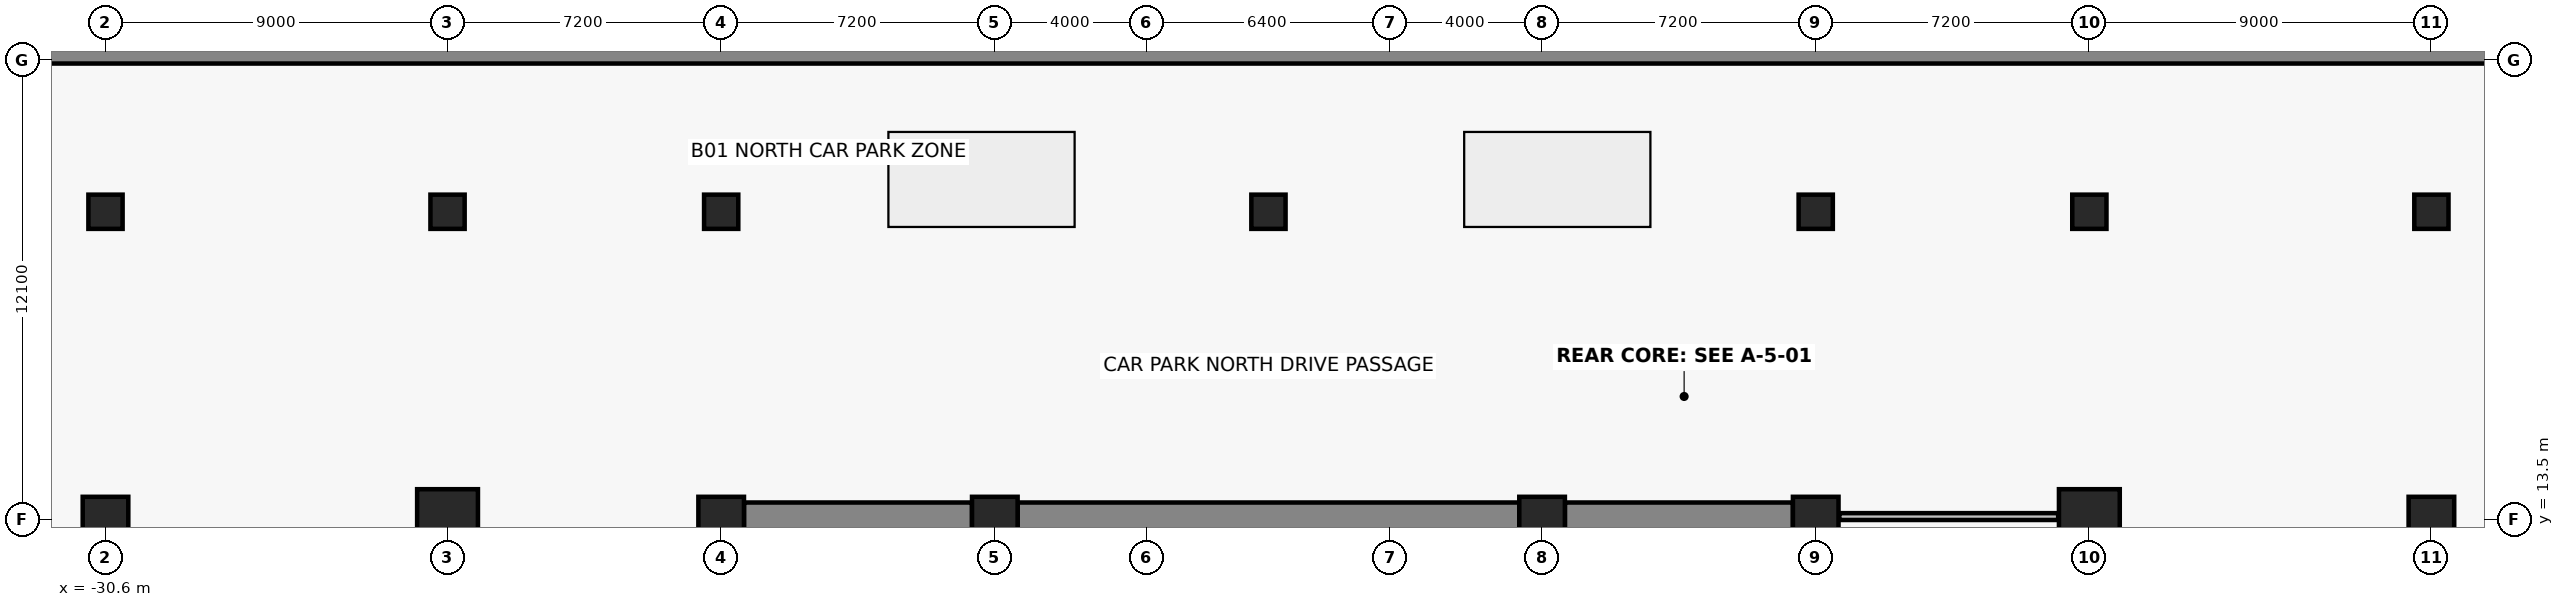
"""IFC4 building model, lengths in metres.
Left out: names, types, materials, properties, quantities, classifications, styles, units other than length and angle.
Written with IfcOpenShell. Run it as: python <this file> out.ifc"""

import sys

from ifc_helpers import new_model, si_unit, direction, frame, frame_2d, origin, origin_2d, place, context, subcontext, project, spatial, rectangle, extrude, element, save


model = new_model("IFC4")
c1 = context("Model", 3, precision=1e-05, world=origin(), true_north=direction((0.0, 1.0)))
c2 = subcontext(c1, "Body", "Model", "MODEL_VIEW")
j1 = project(units=[si_unit("LENGTHUNIT", "METRE"), si_unit("PLANEANGLEUNIT", "RADIAN")], contexts=[c1])
p1 = place(None, origin())
s1 = spatial("IfcSite", under=j1, at=p1, CompositionType="ELEMENT")
p2 = place(p1, origin())
s2 = spatial("IfcBuilding", under=s1, at=p2, CompositionType="ELEMENT")
p3 = place(p2, frame((0.0, 0.0, -4.4)))
s3 = spatial("IfcBuildingStorey", under=s2, at=p3, CompositionType="ELEMENT", Elevation=-4.4)
p4 = place(p3, frame((-37.1, 25.85, 0.0), z_axis=(0.0, 0.0, 1.0), x_axis=(1.0, 0.0, 0.0)))
e1 = element("IfcWall", 1, at=p4, inside=s3, PredefinedType="USERDEFINED", context=c2, shape_type="SweptSolid", body=[
    extrude(rectangle(XDim=74.2, YDim=0.7, at=frame_2d((37.1, 0.0))), origin(), (0.0, 0.0, 1.0), 4.1),
])
for number, where, z_axis, x_axis in (
    (2, (-14.4, 13.5, 0.0), (0.0, 0.0, 1.0), (1.0, 0.0, 0.0)),
    (3, (-7.2, 13.5, 0.0), (0.0, 0.0, 1.0), (1.0, 0.0, 0.0)),
    (4, (7.2, 13.5, 0.0), (0.0, 0.0, 1.0), (1.0, 0.0, 0.0)),
    (5, (14.4, 13.5, 0.0), (0.0, 0.0, 1.0), (1.0, 0.0, 0.0)),
):
    element("IfcColumn", number, at=place(p3, frame(where, z_axis=z_axis, x_axis=x_axis)), inside=s3, PredefinedType="COLUMN", context=c2, shape_type="SweptSolid", body=[
        extrude(rectangle(XDim=1.2, YDim=1.2, at=origin_2d()), origin(), (0.0, 0.0, 1.0), 4.4),
    ])
for number, where, z_axis, x_axis in (
    (6, (-21.6, 13.5, 0.0), (0.0, 0.0, 1.0), (1.0, 0.0, 0.0)),
    (7, (21.6, 13.5, 0.0), (0.0, 0.0, 1.0), (1.0, 0.0, 0.0)),
):
    element("IfcColumn", number, at=place(p3, frame(where, z_axis=z_axis, x_axis=x_axis)), inside=s3, PredefinedType="COLUMN", context=c2, shape_type="SweptSolid", body=[
        extrude(rectangle(XDim=1.6, YDim=1.6, at=origin_2d()), origin(), (0.0, 0.0, 1.0), 4.4),
    ])
for number, where, z_axis, x_axis in (
    (8, (-30.6, 13.5, 0.0), (0.0, 0.0, 1.0), (1.0, 0.0, 0.0)),
    (9, (30.6, 13.5, 0.0), (0.0, 0.0, 1.0), (1.0, 0.0, 0.0)),
):
    element("IfcColumn", number, at=place(p3, frame(where, z_axis=z_axis, x_axis=x_axis)), inside=s3, PredefinedType="COLUMN", context=c2, shape_type="SweptSolid", body=[
        extrude(rectangle(XDim=1.2, YDim=1.2, at=origin_2d()), origin(), (0.0, 0.0, 1.0), 4.4),
    ])
for number, where, z_axis, x_axis in (
    (10, (-30.6, 21.6, 0.0), (0.0, 0.0, 1.0), (1.0, 0.0, 0.0)),
    (11, (30.6, 21.6, 0.0), (0.0, 0.0, 1.0), (1.0, 0.0, 0.0)),
    (12, (-21.6, 21.6, 0.0), (0.0, 0.0, 1.0), (1.0, 0.0, 0.0)),
    (13, (21.6, 21.6, 0.0), (0.0, 0.0, 1.0), (1.0, 0.0, 0.0)),
    (14, (-14.4, 21.6, 0.0), (0.0, 0.0, 1.0), (1.0, 0.0, 0.0)),
    (15, (0.0, 21.6, 0.0), (0.0, 0.0, 1.0), (1.0, 0.0, 0.0)),
    (16, (14.4, 21.6, 0.0), (0.0, 0.0, 1.0), (1.0, 0.0, 0.0)),
):
    element("IfcColumn", number, at=place(p3, frame(where, z_axis=z_axis, x_axis=x_axis)), inside=s3, PredefinedType="COLUMN", context=c2, shape_type="SweptSolid", body=[
        extrude(rectangle(XDim=0.9, YDim=0.9, at=origin_2d()), origin(), (0.0, 0.0, 1.0), 4.4),
    ])
p5 = place(p3, frame((-13.8, 13.5, 0.0), z_axis=(0.0, 0.0, 1.0), x_axis=(1.0, 0.0, 0.0)))
e17 = element("IfcWall", 17, at=p5, inside=s3, PredefinedType="SHEAR", context=c2, shape_type="SweptSolid", body=[
    extrude(rectangle(XDim=6.0, YDim=0.9, at=frame_2d((3.0, 0.0))), origin(), (0.0, 0.0, 1.0), 4.1),
])
p6 = place(p3, frame((-6.6, 13.5, 0.0), z_axis=(0.0, 0.0, 1.0), x_axis=(1.0, 0.0, 0.0)))
e18 = element("IfcWall", 18, at=p6, inside=s3, PredefinedType="SHEAR", context=c2, shape_type="SweptSolid", body=[
    extrude(rectangle(XDim=13.2, YDim=0.9, at=frame_2d((6.6, 0.0))), origin(), (0.0, 0.0, 1.0), 4.1),
])
p7 = place(p3, frame((7.8, 13.5, 0.0), z_axis=(0.0, 0.0, 1.0), x_axis=(1.0, 0.0, 0.0)))
e19 = element("IfcWall", 19, at=p7, inside=s3, PredefinedType="SHEAR", context=c2, shape_type="SweptSolid", body=[
    extrude(rectangle(XDim=6.0, YDim=0.9, at=frame_2d((3.0, 0.0))), origin(), (0.0, 0.0, 1.0), 4.1),
])
p8 = place(p3, frame((15.02, 13.58, 0.0), z_axis=(0.0, 0.0, 1.0), x_axis=(1.0, 0.0, 0.0)))
e20 = element("IfcWall", 20, at=p8, inside=s3, PredefinedType="PARTITIONING", context=c2, shape_type="SweptSolid", body=[
    extrude(rectangle(XDim=5.76, YDim=0.18, at=frame_2d((2.88, 0.0))), origin(), (0.0, 0.0, 1.0), 3.19),
])
save(model, sys.argv[1])
